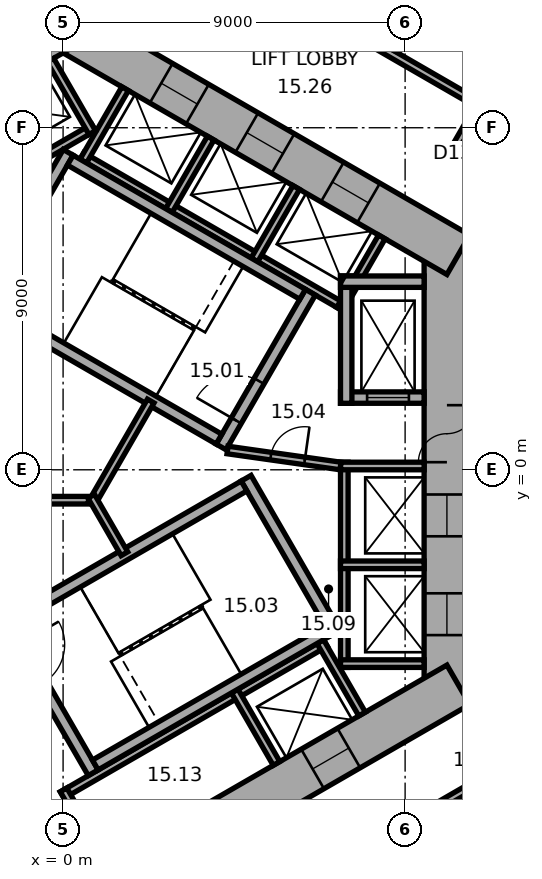
"""IFC4 building model, lengths in metres.
Left out: names, types, materials, properties, quantities, classifications, styles, units other than length and angle.
Written with IfcOpenShell. Run it as: python <this file> out.ifc"""

import sys

from ifc_helpers import new_model, si_unit, direction, frame, frame_2d, origin, place, context, subcontext, project, spatial, rectangle, extrude, element, fill, save


model = new_model("IFC4")
c1 = context("Model", 3, precision=1e-05, world=origin(), true_north=direction((0.0, 1.0)))
c2 = subcontext(c1, "Body", "Model", "MODEL_VIEW")
j1 = project(units=[si_unit("LENGTHUNIT", "METRE"), si_unit("PLANEANGLEUNIT", "RADIAN")], contexts=[c1])
p1 = place(None, origin())
s1 = spatial("IfcSite", under=j1, at=p1, CompositionType="ELEMENT")
p2 = place(p1, origin())
s2 = spatial("IfcBuilding", under=s1, at=p2, CompositionType="ELEMENT")
p3 = place(p2, frame((0.0, 0.0, 70.4)))
s3 = spatial("IfcBuildingStorey", under=s2, at=p3, CompositionType="ELEMENT", Elevation=70.4)
p4 = place(p3, frame((10.1, -6.177, 0.0), z_axis=(0.0, 0.0, 1.0), x_axis=(0.0, 1.0, 0.0)))
e1 = element("IfcWall", 1, at=p4, inside=s3, PredefinedType="SHEAR", context=c2, shape_type="SweptSolid", body=[
    extrude(rectangle(XDim=12.355, YDim=1.2, at=frame_2d((6.177, 0.0))), origin(), (0.0, 0.0, 1.0), 3.3),
])
p5 = place(p4, frame((6.378, 0.0, 0.0)))
e2 = element("IfcOpeningElement", 2, at=p5, cuts=e1, PredefinedType="OPENING", context=c2, shape_type="SweptSolid", body=[
    extrude(rectangle(XDim=1.5, YDim=2.1, at=frame_2d((0.75, 1.05))), frame((0.0, 0.61, 0.0), z_axis=(0.0, -1.0, 0.0), x_axis=(1.0, 0.0, 0.0)), (0.0, 0.0, 1.0), 1.22),
])
p6 = place(p4, frame((1.828, 0.0, 0.0)))
e3 = element("IfcOpeningElement", 3, at=p6, cuts=e1, PredefinedType="OPENING", context=c2, shape_type="SweptSolid", body=[
    extrude(rectangle(XDim=1.1, YDim=2.1, at=frame_2d((0.55, 1.05))), frame((0.0, 0.61, 0.0), z_axis=(0.0, -1.0, 0.0), x_axis=(1.0, 0.0, 0.0)), (0.0, 0.0, 1.0), 1.22),
])
p7 = place(p4, frame((4.427, 0.0, 0.0)))
e4 = element("IfcOpeningElement", 4, at=p7, cuts=e1, PredefinedType="OPENING", context=c2, shape_type="SweptSolid", body=[
    extrude(rectangle(XDim=1.1, YDim=2.1, at=frame_2d((0.55, 1.05))), frame((0.0, 0.61, 0.0), z_axis=(0.0, -1.0, 0.0), x_axis=(1.0, 0.0, 0.0)), (0.0, 0.0, 1.0), 1.22),
])
p8 = place(p3, frame((10.4, 5.658, 0.0), z_axis=(0.0, 0.0, 1.0), x_axis=(-0.866021384402, 0.500006961711, 0.0)))
e5 = element("IfcWall", 5, at=p8, inside=s3, PredefinedType="SHEAR", context=c2, shape_type="SweptSolid", body=[
    extrude(rectangle(XDim=12.355, YDim=1.2, at=frame_2d((6.178, 0.0))), origin(), (0.0, 0.0, 1.0), 3.3),
])
p9 = place(p8, frame((2.728, 0.0, 0.0)))
e6 = element("IfcOpeningElement", 6, at=p9, cuts=e5, PredefinedType="OPENING", context=c2, shape_type="SweptSolid", body=[
    extrude(rectangle(XDim=1.1, YDim=2.1, at=frame_2d((0.55, 1.05))), frame((0.0, 0.61, 0.0), z_axis=(0.0, -1.0, 0.0), x_axis=(1.0, 0.0, 0.0)), (0.0, 0.0, 1.0), 1.22),
])
p10 = place(p8, frame((5.328, 0.0, 0.0)))
e7 = element("IfcOpeningElement", 7, at=p10, cuts=e5, PredefinedType="OPENING", context=c2, shape_type="SweptSolid", body=[
    extrude(rectangle(XDim=1.1, YDim=2.1, at=frame_2d((0.55, 1.05))), frame((0.0, 0.61, 0.0), z_axis=(0.0, -1.0, 0.0), x_axis=(1.0, 0.0, 0.0)), (0.0, 0.0, 1.0), 1.22),
])
p11 = place(p8, frame((7.928, 0.0, 0.0)))
e8 = element("IfcOpeningElement", 8, at=p11, cuts=e5, PredefinedType="OPENING", context=c2, shape_type="SweptSolid", body=[
    extrude(rectangle(XDim=1.1, YDim=2.1, at=frame_2d((0.55, 1.05))), frame((0.0, 0.61, 0.0), z_axis=(0.0, -1.0, 0.0), x_axis=(1.0, 0.0, 0.0)), (0.0, 0.0, 1.0), 1.22),
])
p12 = place(p3, frame((0.3, 11.836, 0.0), z_axis=(0.0, 0.0, 1.0), x_axis=(-0.866021384402, -0.500006961711, 0.0)))
e9 = element("IfcWall", 9, at=p12, inside=s3, PredefinedType="SHEAR", context=c2, shape_type="SweptSolid", body=[
    extrude(rectangle(XDim=12.355, YDim=1.2, at=frame_2d((6.178, 0.0))), origin(), (0.0, 0.0, 1.0), 3.3),
])
p13 = place(p12, frame((6.378, 0.0, 0.0)))
e10 = element("IfcOpeningElement", 10, at=p13, cuts=e9, PredefinedType="OPENING", context=c2, shape_type="SweptSolid", body=[
    extrude(rectangle(XDim=1.5, YDim=2.1, at=frame_2d((0.75, 1.05))), frame((0.0, 0.61, 0.0), z_axis=(0.0, -1.0, 0.0), x_axis=(1.0, 0.0, 0.0)), (0.0, 0.0, 1.0), 1.22),
])
p14 = place(p12, frame((1.828, 0.0, 0.0)))
e11 = element("IfcOpeningElement", 11, at=p14, cuts=e9, PredefinedType="OPENING", context=c2, shape_type="SweptSolid", body=[
    extrude(rectangle(XDim=1.1, YDim=2.1, at=frame_2d((0.55, 1.05))), frame((0.0, 0.61, 0.0), z_axis=(0.0, -1.0, 0.0), x_axis=(1.0, 0.0, 0.0)), (0.0, 0.0, 1.0), 1.22),
])
p15 = place(p3, frame((-10.4, -5.658, 0.0), z_axis=(0.0, 0.0, 1.0), x_axis=(0.866021384402, -0.500006961711, 0.0)))
e12 = element("IfcWall", 12, at=p15, inside=s3, PredefinedType="SHEAR", context=c2, shape_type="SweptSolid", body=[
    extrude(rectangle(XDim=12.355, YDim=1.2, at=frame_2d((6.178, 0.0))), origin(), (0.0, 0.0, 1.0), 3.3),
])
p16 = place(p15, frame((6.378, 0.0, 0.0)))
e13 = element("IfcOpeningElement", 13, at=p16, cuts=e12, PredefinedType="OPENING", context=c2, shape_type="SweptSolid", body=[
    extrude(rectangle(XDim=1.5, YDim=2.1, at=frame_2d((0.75, 1.05))), frame((0.0, 0.61, 0.0), z_axis=(0.0, -1.0, 0.0), x_axis=(1.0, 0.0, 0.0)), (0.0, 0.0, 1.0), 1.22),
])
p17 = place(p15, frame((3.228, 0.0, 0.0)))
e14 = element("IfcOpeningElement", 14, at=p17, cuts=e12, PredefinedType="OPENING", context=c2, shape_type="SweptSolid", body=[
    extrude(rectangle(XDim=0.9, YDim=2.1, at=frame_2d((0.45, 1.05))), frame((0.0, 0.61, 0.0), z_axis=(0.0, -1.0, 0.0), x_axis=(1.0, 0.0, 0.0)), (0.0, 0.0, 1.0), 1.22),
])
p18 = place(p3, frame((-0.3, -11.836, 0.0), z_axis=(0.0, 0.0, 1.0), x_axis=(0.866021384402, 0.500006961711, 0.0)))
e15 = element("IfcWall", 15, at=p18, inside=s3, PredefinedType="SHEAR", context=c2, shape_type="SweptSolid", body=[
    extrude(rectangle(XDim=12.355, YDim=1.2, at=frame_2d((6.178, 0.0))), origin(), (0.0, 0.0, 1.0), 3.3),
])
p19 = place(p18, frame((4.128, 0.0, 0.0)))
e16 = element("IfcOpeningElement", 16, at=p19, cuts=e15, PredefinedType="OPENING", context=c2, shape_type="SweptSolid", body=[
    extrude(rectangle(XDim=0.9, YDim=2.1, at=frame_2d((0.45, 1.05))), frame((0.0, 0.61, 0.0), z_axis=(0.0, -1.0, 0.0), x_axis=(1.0, 0.0, 0.0)), (0.0, 0.0, 1.0), 1.22),
])
p20 = place(p18, frame((7.928, 0.0, 0.0)))
e17 = element("IfcOpeningElement", 17, at=p20, cuts=e15, PredefinedType="OPENING", context=c2, shape_type="SweptSolid", body=[
    extrude(rectangle(XDim=1.1, YDim=2.1, at=frame_2d((0.55, 1.05))), frame((0.0, 0.61, 0.0), z_axis=(0.0, -1.0, 0.0), x_axis=(1.0, 0.0, 0.0)), (0.0, 0.0, 1.0), 1.22),
])
p21 = place(p3, frame((7.4, -5.2, 0.0), z_axis=(0.0, 0.0, 1.0), x_axis=(0.0, 1.0, 0.0)))
e18 = element("IfcWall", 18, at=p21, inside=s3, PredefinedType="PARTITIONING", context=c2, shape_type="SweptSolid", body=[
    extrude(rectangle(XDim=5.4, YDim=0.2, at=frame_2d((2.7, 0.0))), origin(), (0.0, 0.0, 1.0), 3.05),
])
for number, where, z_axis, x_axis in (
    (19, (7.3, -5.1, 0.0), (0.0, 0.0, 1.0), (1.0, 0.0, 0.0)),
    (20, (7.3, -2.5, 0.0), (0.0, 0.0, 1.0), (1.0, 0.0, 0.0)),
    (21, (7.3, 0.1, 0.0), (0.0, 0.0, 1.0), (1.0, 0.0, 0.0)),
):
    element("IfcWall", number, at=place(p3, frame(where, z_axis=z_axis, x_axis=x_axis)), inside=s3, PredefinedType="PARTITIONING", context=c2, shape_type="SweptSolid", body=[
        extrude(rectangle(XDim=2.2, YDim=0.2, at=frame_2d((1.1, 0.0))), origin(), (0.0, 0.0, 1.0), 3.05),
    ])
p22 = place(p3, frame((7.424, 4.259, 0.0), z_axis=(0.0, 0.0, 1.0), x_axis=(-0.866026010844, 0.49999894854, 0.0)))
e22 = element("IfcWall", 22, at=p22, inside=s3, PredefinedType="PARTITIONING", context=c2, shape_type="SweptSolid", body=[
    extrude(rectangle(XDim=8.0, YDim=0.2, at=frame_2d((4.0, 0.0))), origin(), (0.0, 0.0, 1.0), 3.05),
])
for number, where, z_axis, x_axis in (
    (23, (7.287, 4.222, 0.0), (0.0, 0.0, 1.0), (0.5, 0.866, 0.0)),
    (24, (5.036, 5.522, 0.0), (0.0, 0.0, 1.0), (0.5, 0.866, 0.0)),
    (25, (2.784, 6.822, 0.0), (0.0, 0.0, 1.0), (0.5, 0.866, 0.0)),
    (26, (0.532, 8.122, 0.0), (0.0, 0.0, 1.0), (0.5, 0.866, 0.0)),
):
    element("IfcWall", number, at=place(p3, frame(where, z_axis=z_axis, x_axis=x_axis)), inside=s3, PredefinedType="PARTITIONING", context=c2, shape_type="SweptSolid", body=[
        extrude(rectangle(XDim=2.2, YDim=0.2, at=frame_2d((1.1, 0.0))), origin(), (0.0, 0.0, 1.0), 3.05),
    ])
p23 = place(p3, frame((0.803, 9.009, 0.0), z_axis=(0.0, 0.0, 1.0), x_axis=(-0.866028230842, -0.499995103361, 0.0)))
e27 = element("IfcWall", 27, at=p23, inside=s3, PredefinedType="PARTITIONING", context=c2, shape_type="SweptSolid", body=[
    extrude(rectangle(XDim=5.4, YDim=0.2, at=frame_2d((2.7, 0.0))), origin(), (0.0, 0.0, 1.0), 3.05),
])
p24 = place(p3, frame((0.767, 8.872, 0.0), z_axis=(0.0, 0.0, 1.0), x_axis=(-0.499994660107, 0.866028486751, 0.0)))
e28 = element("IfcWall", 28, at=p24, inside=s3, PredefinedType="PARTITIONING", context=c2, shape_type="SweptSolid", body=[
    extrude(rectangle(XDim=2.2, YDim=0.2, at=frame_2d((1.1, 0.0))), origin(), (0.0, 0.0, 1.0), 3.05),
])
p25 = place(p3, frame((-0.024, -8.559, 0.0), z_axis=(0.0, 0.0, 1.0), x_axis=(0.866026010844, 0.49999894854, 0.0)))
e29 = element("IfcWall", 29, at=p25, inside=s3, PredefinedType="PARTITIONING", context=c2, shape_type="SweptSolid", body=[
    extrude(rectangle(XDim=8.0, YDim=0.2, at=frame_2d((4.0, 0.0))), origin(), (0.0, 0.0, 1.0), 3.05),
])
for number, where, z_axis, x_axis in (
    (30, (0.013, -8.422, 0.0), (0.0, 0.0, 1.0), (0.5, -0.866, 0.0)),
    (31, (4.516, -5.822, 0.0), (0.0, 0.0, 1.0), (0.5, -0.866, 0.0)),
    (32, (6.768, -4.522, 0.0), (0.0, 0.0, 1.0), (0.5, -0.866, 0.0)),
):
    element("IfcWall", number, at=place(p3, frame(where, z_axis=z_axis, x_axis=x_axis)), inside=s3, PredefinedType="PARTITIONING", context=c2, shape_type="SweptSolid", body=[
        extrude(rectangle(XDim=2.2, YDim=0.2, at=frame_2d((1.1, 0.0))), origin(), (0.0, 0.0, 1.0), 3.05),
    ])
p26 = place(p3, frame((4.158, 0.602, 0.0), z_axis=(0.0, 0.0, 1.0), x_axis=(0.499977259774, 0.866038532462, 0.0)))
e33 = element("IfcWall", 33, at=p26, inside=s3, PredefinedType="SHEAR", context=c2, shape_type="SweptSolid", body=[
    extrude(rectangle(XDim=4.7, YDim=0.3, at=frame_2d((2.35, 0.0))), origin(), (0.0, 0.0, 1.0), 3.05),
])
p27 = place(p26, frame((0.8, 0.0, 0.0)))
e34 = element("IfcOpeningElement", 34, at=p27, cuts=e33, PredefinedType="OPENING", context=c2, shape_type="SweptSolid", body=[
    extrude(rectangle(XDim=1.2, YDim=2.1, at=frame_2d((0.6, 1.05))), frame((0.0, 0.16, 0.0), z_axis=(0.0, -1.0, 0.0), x_axis=(1.0, 0.0, 0.0)), (0.0, 0.0, 1.0), 0.32),
])
p28 = place(p3, frame((-2.216, 4.282, 0.0), z_axis=(0.0, 0.0, 1.0), x_axis=(0.499977259774, 0.866038532462, 0.0)))
e35 = element("IfcWall", 35, at=p28, inside=s3, PredefinedType="SHEAR", context=c2, shape_type="SweptSolid", body=[
    extrude(rectangle(XDim=4.7, YDim=0.3, at=frame_2d((2.35, 0.0))), origin(), (0.0, 0.0, 1.0), 3.05),
])
for number, where, z_axis, x_axis in (
    (36, (4.103, 0.807, 0.0), (0.0, 0.0, 1.0), (-0.866, 0.5, 0.0)),
    (37, (6.303, 4.617, 0.0), (0.0, 0.0, 1.0), (-0.866, 0.5, 0.0)),
):
    element("IfcWall", number, at=place(p3, frame(where, z_axis=z_axis, x_axis=x_axis)), inside=s3, PredefinedType="SHEAR", context=c2, shape_type="SweptSolid", body=[
        extrude(rectangle(XDim=7.06, YDim=0.3, at=frame_2d((3.53, 0.0))), origin(), (0.0, 0.0, 1.0), 3.05),
    ])
p29 = place(p3, frame((-1.558, -3.902, 0.0), z_axis=(0.0, 0.0, 1.0), x_axis=(0.499977259774, -0.866038532462, 0.0)))
e38 = element("IfcWall", 38, at=p29, inside=s3, PredefinedType="SHEAR", context=c2, shape_type="SweptSolid", body=[
    extrude(rectangle(XDim=4.7, YDim=0.3, at=frame_2d((2.35, 0.0))), origin(), (0.0, 0.0, 1.0), 3.05),
])
p30 = place(p29, frame((0.8, 0.0, 0.0)))
e39 = element("IfcOpeningElement", 39, at=p30, cuts=e38, PredefinedType="OPENING", context=c2, shape_type="SweptSolid", body=[
    extrude(rectangle(XDim=1.2, YDim=2.1, at=frame_2d((0.6, 1.05))), frame((0.0, 0.16, 0.0), z_axis=(0.0, -1.0, 0.0), x_axis=(1.0, 0.0, 0.0)), (0.0, 0.0, 1.0), 0.32),
])
p31 = place(p3, frame((4.816, -0.222, 0.0), z_axis=(0.0, 0.0, 1.0), x_axis=(0.499977259774, -0.866038532462, 0.0)))
e40 = element("IfcWall", 40, at=p31, inside=s3, PredefinedType="SHEAR", context=c2, shape_type="SweptSolid", body=[
    extrude(rectangle(XDim=4.7, YDim=0.3, at=frame_2d((2.35, 0.0))), origin(), (0.0, 0.0, 1.0), 3.05),
])
for number, where, z_axis, x_axis in (
    (41, (-1.353, -3.957, 0.0), (0.0, 0.0, 1.0), (0.866, 0.5, 0.0)),
    (42, (0.847, -7.767, 0.0), (0.0, 0.0, 1.0), (0.866, 0.5, 0.0)),
):
    element("IfcWall", number, at=place(p3, frame(where, z_axis=z_axis, x_axis=x_axis)), inside=s3, PredefinedType="SHEAR", context=c2, shape_type="SweptSolid", body=[
        extrude(rectangle(XDim=7.06, YDim=0.3, at=frame_2d((3.53, 0.0))), origin(), (0.0, 0.0, 1.0), 3.05),
    ])
p32 = place(p3, frame((7.3, 1.9, 0.0), z_axis=(0.0, 0.0, 1.0), x_axis=(1.0, 0.0, 0.0)))
e43 = element("IfcWall", 43, at=p32, inside=s3, PredefinedType="SHEAR", context=c2, shape_type="SweptSolid", body=[
    extrude(rectangle(XDim=2.2, YDim=0.3, at=frame_2d((1.1, 0.0))), origin(), (0.0, 0.0, 1.0), 3.05),
])
p33 = place(p32, frame((0.7, 0.0, 0.0)))
e44 = element("IfcOpeningElement", 44, at=p33, cuts=e43, PredefinedType="OPENING", context=c2, shape_type="SweptSolid", body=[
    extrude(rectangle(XDim=1.1, YDim=2.1, at=frame_2d((0.55, 1.05))), frame((0.0, 0.16, 0.0), z_axis=(0.0, -1.0, 0.0), x_axis=(1.0, 0.0, 0.0)), (0.0, 0.0, 1.0), 0.32),
])
p34 = place(p3, frame((7.45, 1.75, 0.0), z_axis=(0.0, 0.0, 1.0), x_axis=(0.0, 1.0, 0.0)))
e45 = element("IfcWall", 45, at=p34, inside=s3, PredefinedType="SHEAR", context=c2, shape_type="SweptSolid", body=[
    extrude(rectangle(XDim=3.35, YDim=0.3, at=frame_2d((1.675, 0.0))), origin(), (0.0, 0.0, 1.0), 3.05),
])
p35 = place(p3, frame((7.3, 4.95, 0.0), z_axis=(0.0, 0.0, 1.0), x_axis=(1.0, 0.0, 0.0)))
e46 = element("IfcWall", 46, at=p35, inside=s3, PredefinedType="SHEAR", context=c2, shape_type="SweptSolid", body=[
    extrude(rectangle(XDim=2.2, YDim=0.3, at=frame_2d((1.1, 0.0))), origin(), (0.0, 0.0, 1.0), 3.05),
])
p36 = place(p3, frame((4.327, 0.521, 0.0), z_axis=(0.0, 0.0, 1.0), x_axis=(0.990124376366, -0.14019172346, 0.0)))
e47 = element("IfcWall", 47, at=p36, inside=s3, PredefinedType="PARTITIONING", context=c2, shape_type="SweptSolid", body=[
    extrude(rectangle(XDim=3.002, YDim=0.2, at=frame_2d((1.501, 0.0))), origin(), (0.0, 0.0, 1.0), 3.05),
])
p37 = place(p36, frame((1.15, 0.0, 0.0)))
e48 = element("IfcOpeningElement", 48, at=p37, cuts=e47, PredefinedType="OPENING", context=c2, shape_type="SweptSolid", body=[
    extrude(rectangle(XDim=0.9, YDim=2.1, at=frame_2d((0.45, 1.05))), frame((0.0, 0.11, 0.0), z_axis=(0.0, -1.0, 0.0), x_axis=(1.0, 0.0, 0.0)), (0.0, 0.0, 1.0), 0.22),
])
p38 = place(p3, frame((0.92, -0.8, 0.0), z_axis=(0.0, 0.0, 1.0), x_axis=(-1.0, 0.0, 0.0)))
e49 = element("IfcWall", 49, at=p38, inside=s3, PredefinedType="PARTITIONING", context=c2, shape_type="SweptSolid", body=[
    extrude(rectangle(XDim=3.64, YDim=0.2, at=frame_2d((1.82, 0.0))), origin(), (0.0, 0.0, 1.0), 3.05),
])
p39 = place(p3, frame((0.74, -0.904, 0.0), z_axis=(0.0, 0.0, 1.0), x_axis=(0.500028278809, 0.866009076391, 0.0)))
e50 = element("IfcWall", 50, at=p39, inside=s3, PredefinedType="PARTITIONING", context=c2, shape_type="SweptSolid", body=[
    extrude(rectangle(XDim=3.133, YDim=0.2, at=frame_2d((1.566, 0.0))), origin(), (0.0, 0.0, 1.0), 3.05),
])
p40 = place(p3, frame((0.74, -0.696, 0.0), z_axis=(0.0, 0.0, 1.0), x_axis=(0.499956301907, -0.86605063142, 0.0)))
e51 = element("IfcWall", 51, at=p40, inside=s3, PredefinedType="PARTITIONING", context=c2, shape_type="SweptSolid", body=[
    extrude(rectangle(XDim=1.747, YDim=0.2, at=frame_2d((0.874, 0.0))), origin(), (0.0, 0.0, 1.0), 3.05),
])
p41 = place(p3, frame((9.852, -8.861, 0.0), z_axis=(0.0, 0.0, 1.0), x_axis=(0.866013291437, 0.500020978615, 0.0)))
e52 = element("IfcWall", 52, at=p41, inside=s3, PredefinedType="PARTITIONING", context=c2, shape_type="SweptSolid", body=[
    extrude(rectangle(XDim=2.077, YDim=0.2, at=frame_2d((1.038, 0.0))), origin(), (0.0, 0.0, 1.0), 3.05),
])
p42 = place(p3, frame((10.371, 8.561, 0.0), z_axis=(0.0, 0.0, 1.0), x_axis=(0.499986357472, 0.866033280158, 0.0)))
e53 = element("IfcWall", 53, at=p42, inside=s3, PredefinedType="PARTITIONING", context=c2, shape_type="SweptSolid", body=[
    extrude(rectangle(XDim=1.201, YDim=0.2, at=frame_2d((0.601, 0.0))), origin(), (0.0, 0.0, 1.0), 3.05),
])
p43 = place(p3, frame((10.885, 9.652, 0.0), z_axis=(0.0, 0.0, 1.0), x_axis=(-0.866033868542, 0.499985338323, 0.0)))
e54 = element("IfcWall", 54, at=p43, inside=s3, PredefinedType="PARTITIONING", context=c2, shape_type="SweptSolid", body=[
    extrude(rectangle(XDim=8.602, YDim=0.2, at=frame_2d((4.301, 0.0))), origin(), (0.0, 0.0, 1.0), 3.05),
])
p44 = place(p43, frame((5.302, 0.0, 0.0)))
e55 = element("IfcOpeningElement", 55, at=p44, cuts=e54, PredefinedType="OPENING", context=c2, shape_type="SweptSolid", body=[
    extrude(rectangle(XDim=0.9, YDim=2.1, at=frame_2d((0.45, 1.05))), frame((0.0, 0.11, 0.0), z_axis=(0.0, -1.0, 0.0), x_axis=(1.0, 0.0, 0.0)), (0.0, 0.0, 1.0), 0.22),
])
p45 = place(p3, frame((11.566, 7.871, 0.0), z_axis=(0.0, 0.0, 1.0), x_axis=(-0.866004557827, 0.500036104519, 0.0)))
e56 = element("IfcWall", 56, at=p45, inside=s3, PredefinedType="PARTITIONING", context=c2, shape_type="SweptSolid", body=[
    extrude(rectangle(XDim=1.28, YDim=0.2, at=frame_2d((0.64, 0.0))), origin(), (0.0, 0.0, 1.0), 3.05),
])
p46 = place(p45, frame((0.19, 0.0, 0.0)))
e57 = element("IfcOpeningElement", 57, at=p46, cuts=e56, PredefinedType="OPENING", context=c2, shape_type="SweptSolid", body=[
    extrude(rectangle(XDim=0.9, YDim=2.1, at=frame_2d((0.45, 1.05))), frame((0.0, 0.11, 0.0), z_axis=(0.0, -1.0, 0.0), x_axis=(1.0, 0.0, 0.0)), (0.0, 0.0, 1.0), 0.22),
])
p47 = place(p3, frame((12.393, 18.348, 0.0), z_axis=(0.0, 0.0, 1.0), x_axis=(-0.446176022699, -0.894945225569, 0.0)))
e58 = element("IfcWall", 58, at=p47, inside=s3, PredefinedType="PARTITIONING", context=c2, shape_type="SweptSolid", body=[
    extrude(rectangle(XDim=8.191, YDim=0.2, at=frame_2d((4.095, 0.0))), origin(), (0.0, 0.0, 1.0), 2.6),
])
p48 = place(p5, origin())
e59 = element("IfcDoor", 59, at=p48, inside=s3, OperationType="DOUBLE_DOOR_SINGLE_SWING", PredefinedType="DOOR", context=c2, shape_type="SweptSolid", body=[
    extrude(rectangle(XDim=1.5, YDim=2.1, at=frame_2d((0.75, 1.05))), frame((0.0, 0.025, 0.0), z_axis=(0.0, -1.0, 0.0), x_axis=(1.0, 0.0, 0.0)), (0.0, 0.0, 1.0), 0.05),
])
fill(e2, e59)
p49 = place(p27, origin())
e60 = element("IfcDoor", 60, at=p49, inside=s3, OperationType="SINGLE_SWING_RIGHT", PredefinedType="DOOR", context=c2, shape_type="SweptSolid", body=[
    extrude(rectangle(XDim=1.2, YDim=2.1, at=frame_2d((0.6, 1.05))), frame((0.0, 0.025, 0.0), z_axis=(0.0, -1.0, 0.0), x_axis=(1.0, 0.0, 0.0)), (0.0, 0.0, 1.0), 0.05),
])
fill(e34, e60)
p50 = place(p37, origin())
e61 = element("IfcDoor", 61, at=p50, inside=s3, OperationType="SINGLE_SWING_LEFT", PredefinedType="DOOR", context=c2, shape_type="SweptSolid", body=[
    extrude(rectangle(XDim=0.9, YDim=2.1, at=frame_2d((0.45, 1.05))), frame((0.0, 0.025, 0.0), z_axis=(0.0, -1.0, 0.0), x_axis=(1.0, 0.0, 0.0)), (0.0, 0.0, 1.0), 0.05),
])
fill(e48, e61)
p51 = place(p33, origin())
e62 = element("IfcDoor", 62, at=p51, inside=s3, OperationType="DOUBLE_DOOR_SLIDING", PredefinedType="DOOR", context=c2, shape_type="SweptSolid", body=[
    extrude(rectangle(XDim=1.1, YDim=2.1, at=frame_2d((0.55, 1.05))), frame((0.0, 0.025, 0.0), z_axis=(0.0, -1.0, 0.0), x_axis=(1.0, 0.0, 0.0)), (0.0, 0.0, 1.0), 0.05),
])
fill(e44, e62)
p52 = place(p6, origin())
e63 = element("IfcDoor", 63, at=p52, inside=s3, OperationType="DOUBLE_DOOR_SLIDING", PredefinedType="DOOR", context=c2, shape_type="SweptSolid", body=[
    extrude(rectangle(XDim=1.1, YDim=2.1, at=frame_2d((0.55, 1.05))), frame((0.0, 0.025, 0.0), z_axis=(0.0, -1.0, 0.0), x_axis=(1.0, 0.0, 0.0)), (0.0, 0.0, 1.0), 0.05),
])
fill(e3, e63)
p53 = place(p7, origin())
e64 = element("IfcDoor", 64, at=p53, inside=s3, OperationType="DOUBLE_DOOR_SLIDING", PredefinedType="DOOR", context=c2, shape_type="SweptSolid", body=[
    extrude(rectangle(XDim=1.1, YDim=2.1, at=frame_2d((0.55, 1.05))), frame((0.0, 0.025, 0.0), z_axis=(0.0, -1.0, 0.0), x_axis=(1.0, 0.0, 0.0)), (0.0, 0.0, 1.0), 0.05),
])
fill(e4, e64)
p54 = place(p9, origin())
e65 = element("IfcDoor", 65, at=p54, inside=s3, OperationType="DOUBLE_DOOR_SLIDING", PredefinedType="DOOR", context=c2, shape_type="SweptSolid", body=[
    extrude(rectangle(XDim=1.1, YDim=2.1, at=frame_2d((0.55, 1.05))), frame((0.0, 0.025, 0.0), z_axis=(0.0, -1.0, 0.0), x_axis=(1.0, 0.0, 0.0)), (0.0, 0.0, 1.0), 0.05),
])
fill(e6, e65)
p55 = place(p10, origin())
e66 = element("IfcDoor", 66, at=p55, inside=s3, OperationType="DOUBLE_DOOR_SLIDING", PredefinedType="DOOR", context=c2, shape_type="SweptSolid", body=[
    extrude(rectangle(XDim=1.1, YDim=2.1, at=frame_2d((0.55, 1.05))), frame((0.0, 0.025, 0.0), z_axis=(0.0, -1.0, 0.0), x_axis=(1.0, 0.0, 0.0)), (0.0, 0.0, 1.0), 0.05),
])
fill(e7, e66)
p56 = place(p11, origin())
e67 = element("IfcDoor", 67, at=p56, inside=s3, OperationType="DOUBLE_DOOR_SLIDING", PredefinedType="DOOR", context=c2, shape_type="SweptSolid", body=[
    extrude(rectangle(XDim=1.1, YDim=2.1, at=frame_2d((0.55, 1.05))), frame((0.0, 0.025, 0.0), z_axis=(0.0, -1.0, 0.0), x_axis=(1.0, 0.0, 0.0)), (0.0, 0.0, 1.0), 0.05),
])
fill(e8, e67)
p57 = place(p20, origin())
e68 = element("IfcDoor", 68, at=p57, inside=s3, OperationType="DOUBLE_DOOR_SLIDING", PredefinedType="DOOR", context=c2, shape_type="SweptSolid", body=[
    extrude(rectangle(XDim=1.1, YDim=2.1, at=frame_2d((0.55, 1.05))), frame((0.0, 0.025, 0.0), z_axis=(0.0, -1.0, 0.0), x_axis=(1.0, 0.0, 0.0)), (0.0, 0.0, 1.0), 0.05),
])
fill(e17, e68)
save(model, sys.argv[1])
